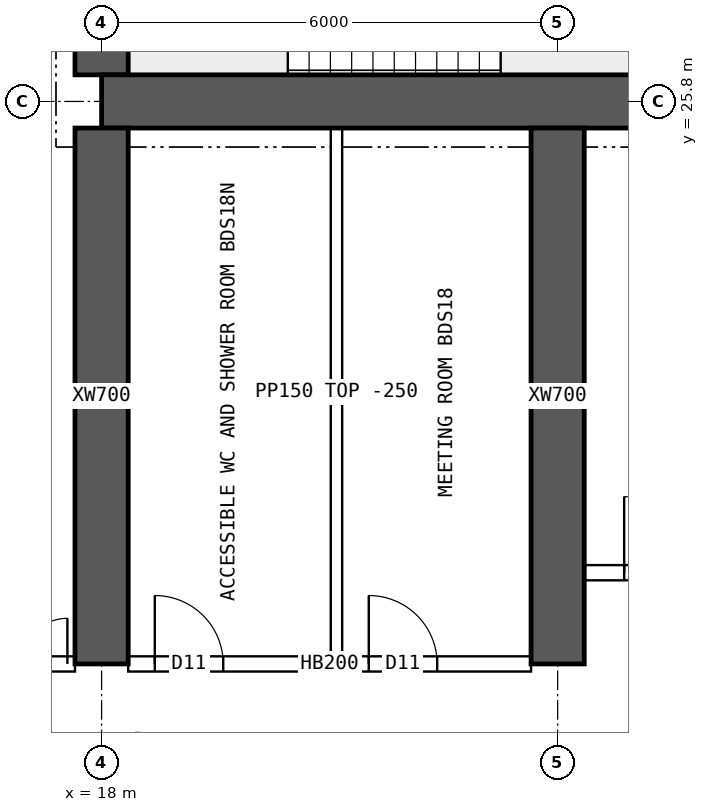
"""IFC4 building model, lengths in metres.
Left out: names, types, materials, properties, quantities, classifications, styles, units other than length and angle.
Written with IfcOpenShell. Run it as: python <this file> out.ifc"""

import sys

from ifc_helpers import new_model, si_unit, direction, frame, frame_2d, origin, place, context, subcontext, project, spatial, rectangle, extrude, element, fill, save


model = new_model("IFC4")
c1 = context("Model", 3, precision=1e-05, world=origin(), true_north=direction((0.0, 1.0)))
c2 = subcontext(c1, "Body", "Model", "MODEL_VIEW")
j1 = project(units=[si_unit("LENGTHUNIT", "METRE"), si_unit("PLANEANGLEUNIT", "RADIAN")], contexts=[c1])
p1 = place(None, origin())
s1 = spatial("IfcSite", under=j1, at=p1, CompositionType="ELEMENT")
p2 = place(p1, origin())
s2 = spatial("IfcBuilding", under=s1, at=p2, CompositionType="ELEMENT")
p3 = place(p2, frame((0.0, 0.0, 220.3)))
s3 = spatial("IfcBuildingStorey", under=s2, at=p3, CompositionType="ELEMENT", Elevation=220.3)
p4 = place(p3, frame((18.0, 25.8, 0.0), z_axis=(0.0, 0.0, 1.0), x_axis=(1.0, 0.0, 0.0)))
e1 = element("IfcWall", 1, at=p4, inside=s3, PredefinedType="SHEAR", context=c2, shape_type="SweptSolid", body=[
    extrude(rectangle(XDim=48.0, YDim=0.7, at=frame_2d((24.0, 0.0))), origin(), (0.0, 0.0, 1.0), 3.75),
])
p5 = place(p3, frame((18.0, 26.15, 0.0), z_axis=(0.0, 0.0, 1.0), x_axis=(0.0, 1.0, 0.0)))
e2 = element("IfcWall", 2, at=p5, inside=s3, PredefinedType="SHEAR", context=c2, shape_type="SweptSolid", body=[
    extrude(rectangle(XDim=11.7, YDim=0.7, at=frame_2d((5.85, 0.0))), origin(), (0.0, 0.0, 1.0), 3.75),
])
p6 = place(p5, frame((5.15, 0.0, 0.0)))
e3 = element("IfcOpeningElement", 3, at=p6, cuts=e2, PredefinedType="OPENING", context=c2, shape_type="SweptSolid", body=[
    extrude(rectangle(XDim=1.2, YDim=2.1, at=frame_2d((0.6, 1.05))), frame((0.0, 0.36, 0.0), z_axis=(0.0, -1.0, 0.0), x_axis=(1.0, 0.0, 0.0)), (0.0, 0.0, 1.0), 0.72),
])
for number, where, z_axis, x_axis in (
    (4, (18.0, 18.4, 0.0), (0.0, 0.0, 1.0), (0.0, 1.0, 0.0)),
    (5, (24.0, 18.4, 0.0), (0.0, 0.0, 1.0), (0.0, 1.0, 0.0)),
):
    element("IfcWall", number, at=place(p3, frame(where, z_axis=z_axis, x_axis=x_axis)), inside=s3, PredefinedType="SHEAR", context=c2, shape_type="SweptSolid", body=[
        extrude(rectangle(XDim=7.05, YDim=0.7, at=frame_2d((3.525, 0.0))), origin(), (0.0, 0.0, 1.0), 3.75),
    ])
p7 = place(p3, frame((15.6, 18.4, 0.0), z_axis=(0.0, 0.0, 1.0), x_axis=(1.0, 0.0, 0.0)))
e6 = element("IfcWall", 6, at=p7, inside=s3, PredefinedType="SOLIDWALL", context=c2, shape_type="SweptSolid", body=[
    extrude(rectangle(XDim=2.05, YDim=0.2, at=frame_2d((1.025, 0.0))), origin(), (0.0, 0.0, 1.0), 3.5),
])
p8 = place(p7, frame((0.75, 0.0, 0.0)))
e7 = element("IfcOpeningElement", 7, at=p8, cuts=e6, PredefinedType="OPENING", context=c2, shape_type="SweptSolid", body=[
    extrude(rectangle(XDim=1.2, YDim=2.1, at=frame_2d((0.6, 1.05))), frame((0.0, 0.11, 0.0), z_axis=(0.0, -1.0, 0.0), x_axis=(1.0, 0.0, 0.0)), (0.0, 0.0, 1.0), 0.22),
])
p9 = place(p3, frame((18.35, 18.4, 0.0), z_axis=(0.0, 0.0, 1.0), x_axis=(1.0, 0.0, 0.0)))
e8 = element("IfcWall", 8, at=p9, inside=s3, PredefinedType="SOLIDWALL", context=c2, shape_type="SweptSolid", body=[
    extrude(rectangle(XDim=5.3, YDim=0.2, at=frame_2d((2.65, 0.0))), origin(), (0.0, 0.0, 1.0), 3.5),
])
p10 = place(p9, frame((0.35, 0.0, 0.0)))
e9 = element("IfcOpeningElement", 9, at=p10, cuts=e8, PredefinedType="OPENING", context=c2, shape_type="SweptSolid", body=[
    extrude(rectangle(XDim=0.9, YDim=2.1, at=frame_2d((0.45, 1.05))), frame((0.0, 0.11, 0.0), z_axis=(0.0, -1.0, 0.0), x_axis=(1.0, 0.0, 0.0)), (0.0, 0.0, 1.0), 0.22),
])
p11 = place(p9, frame((3.165, 0.0, 0.0)))
e10 = element("IfcOpeningElement", 10, at=p11, cuts=e8, PredefinedType="OPENING", context=c2, shape_type="SweptSolid", body=[
    extrude(rectangle(XDim=0.9, YDim=2.1, at=frame_2d((0.45, 1.05))), frame((0.0, 0.11, 0.0), z_axis=(0.0, -1.0, 0.0), x_axis=(1.0, 0.0, 0.0)), (0.0, 0.0, 1.0), 0.22),
])
p12 = place(p3, frame((21.09, 18.5, 0.0), z_axis=(0.0, 0.0, 1.0), x_axis=(0.0, 1.0, 0.0)))
e11 = element("IfcWall", 11, at=p12, inside=s3, PredefinedType="PARTITIONING", context=c2, shape_type="SweptSolid", body=[
    extrude(rectangle(XDim=6.95, YDim=0.15, at=frame_2d((3.475, 0.0))), origin(), (0.0, 0.0, 1.0), 3.5),
])
p13 = place(p3, frame((24.35, 19.6, 0.0), z_axis=(0.0, 0.0, 1.0), x_axis=(1.0, 0.0, 0.0)))
e12 = element("IfcWall", 12, at=p13, inside=s3, PredefinedType="SOLIDWALL", context=c2, shape_type="SweptSolid", body=[
    extrude(rectangle(XDim=5.3, YDim=0.2, at=frame_2d((2.65, 0.0))), origin(), (0.0, 0.0, 1.0), 3.5),
])
p14 = place(p13, frame((0.525, 0.0, 0.0)))
e13 = element("IfcOpeningElement", 13, at=p14, cuts=e12, PredefinedType="OPENING", context=c2, shape_type="SweptSolid", body=[
    extrude(rectangle(XDim=1.0, YDim=2.1, at=frame_2d((0.5, 1.05))), frame((0.0, 0.11, 0.0), z_axis=(0.0, -1.0, 0.0), x_axis=(1.0, 0.0, 0.0)), (0.0, 0.0, 1.0), 0.22),
])
p15 = place(p8, origin())
e14 = element("IfcDoor", 14, at=p15, inside=s3, OperationType="DOUBLE_DOOR_SINGLE_SWING", PredefinedType="DOOR", context=c2, shape_type="SweptSolid", body=[
    extrude(rectangle(XDim=1.2, YDim=2.1, at=frame_2d((0.6, 1.05))), frame((0.0, 0.025, 0.0), z_axis=(0.0, -1.0, 0.0), x_axis=(1.0, 0.0, 0.0)), (0.0, 0.0, 1.0), 0.05),
])
fill(e7, e14)
p16 = place(p10, origin())
e15 = element("IfcDoor", 15, at=p16, inside=s3, OperationType="SINGLE_SWING_LEFT", PredefinedType="DOOR", context=c2, shape_type="SweptSolid", body=[
    extrude(rectangle(XDim=0.9, YDim=2.1, at=frame_2d((0.45, 1.05))), frame((0.0, 0.025, 0.0), z_axis=(0.0, -1.0, 0.0), x_axis=(1.0, 0.0, 0.0)), (0.0, 0.0, 1.0), 0.05),
])
fill(e9, e15)
p17 = place(p11, origin())
e16 = element("IfcDoor", 16, at=p17, inside=s3, OperationType="SINGLE_SWING_LEFT", PredefinedType="DOOR", context=c2, shape_type="SweptSolid", body=[
    extrude(rectangle(XDim=0.9, YDim=2.1, at=frame_2d((0.45, 1.05))), frame((0.0, 0.025, 0.0), z_axis=(0.0, -1.0, 0.0), x_axis=(1.0, 0.0, 0.0)), (0.0, 0.0, 1.0), 0.05),
])
fill(e10, e16)
p18 = place(p14, origin())
e17 = element("IfcDoor", 17, at=p18, inside=s3, OperationType="SINGLE_SWING_LEFT", PredefinedType="DOOR", context=c2, shape_type="SweptSolid", body=[
    extrude(rectangle(XDim=1.0, YDim=2.1, at=frame_2d((0.5, 1.05))), frame((0.0, 0.025, 0.0), z_axis=(0.0, -1.0, 0.0), x_axis=(1.0, 0.0, 0.0)), (0.0, 0.0, 1.0), 0.05),
])
fill(e13, e17)
save(model, sys.argv[1])
